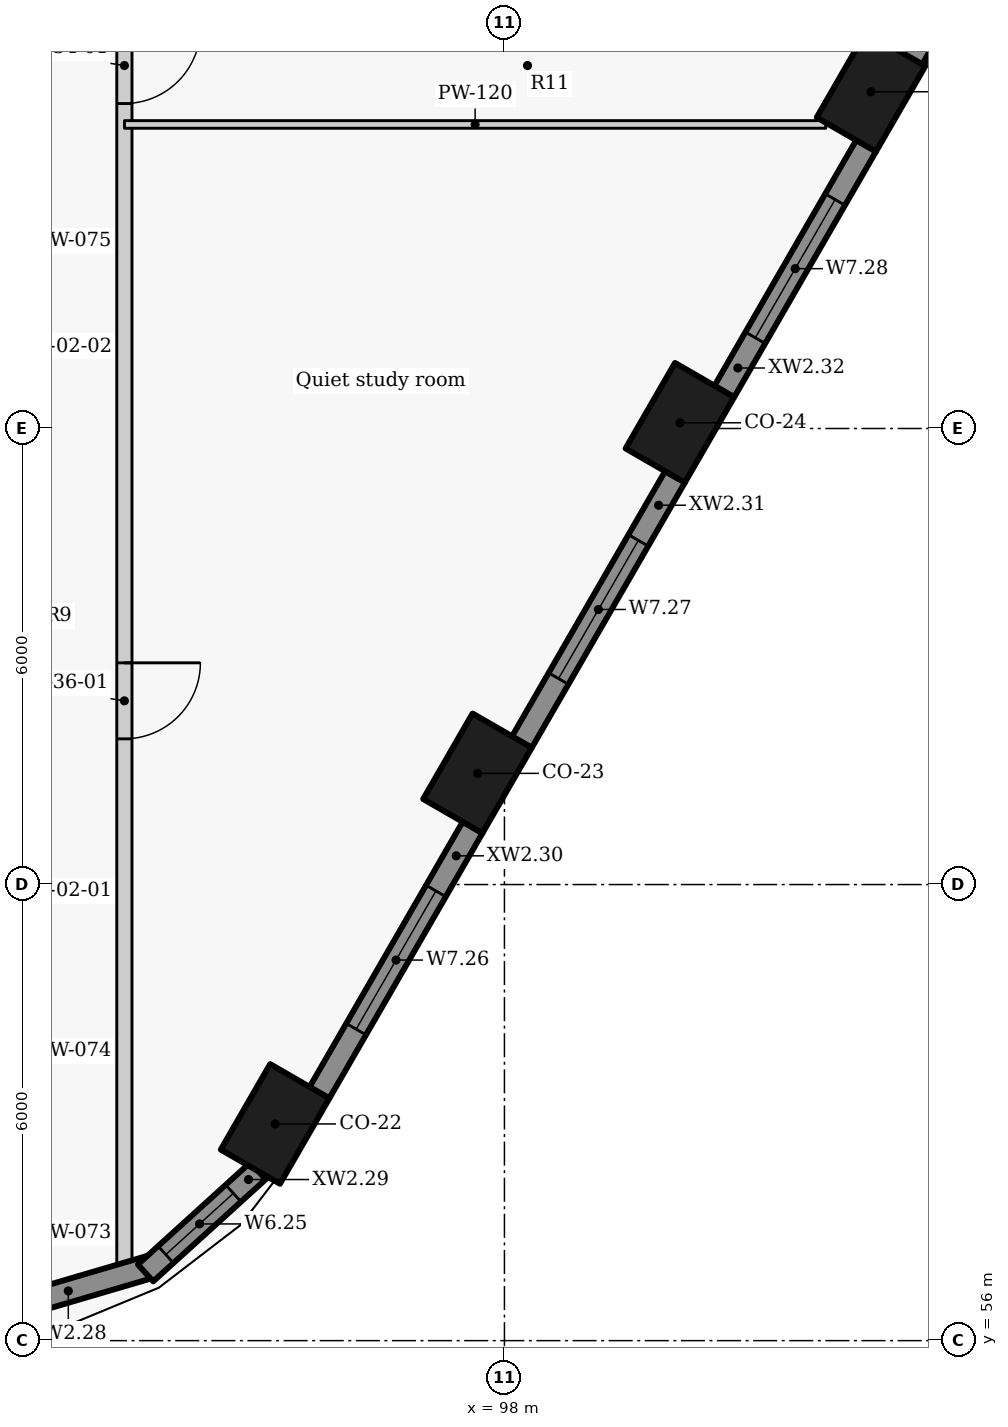
"""IFC4 building model, lengths in metres.
Left out: names, types, materials, properties, quantities, classifications, styles, units other than length and angle.
Written with IfcOpenShell. Run it as: python <this file> out.ifc"""

import sys

from ifc_helpers import new_model, si_unit, direction, frame, frame_2d, origin, origin_2d, place, context, subcontext, project, spatial, rectangle, extrude, element, fill, save


model = new_model("IFC4")
c1 = context("Model", 3, precision=1e-05, world=origin(), true_north=direction((0.0, 1.0)))
c2 = subcontext(c1, "Body", "Model", "MODEL_VIEW")
j1 = project(units=[si_unit("LENGTHUNIT", "METRE"), si_unit("PLANEANGLEUNIT", "RADIAN")], contexts=[c1])
p1 = place(None, origin())
s1 = spatial("IfcSite", under=j1, at=p1, CompositionType="ELEMENT")
p2 = place(p1, origin())
s2 = spatial("IfcBuilding", under=s1, at=p2, CompositionType="ELEMENT")
p3 = place(p2, frame((0.0, 0.0, 166.8)))
s3 = spatial("IfcBuildingStorey", under=s2, at=p3, CompositionType="ELEMENT", Elevation=166.8)
for number, where, z_axis, x_axis in (
    (1, (94.982, 58.851, 0.0), (0.0, 0.0, 1.0), (0.5, 0.866, 0.0)),
    (2, (97.646, 63.463, 0.0), (0.0, 0.0, 1.0), (0.5, 0.866, 0.0)),
    (3, (100.308, 68.075, 0.0), (0.0, 0.0, 1.0), (0.5, 0.866, 0.0)),
    (4, (102.823, 72.43, 0.0), (0.0, 0.0, 1.0), (0.5, 0.866, 0.0)),
):
    element("IfcColumn", number, at=place(p3, frame(where, z_axis=z_axis, x_axis=x_axis)), inside=s3, PredefinedType="COLUMN", context=c2, shape_type="SweptSolid", body=[
        extrude(rectangle(XDim=1.3, YDim=0.9, at=origin_2d()), origin(), (0.0, 0.0, 1.0), 3.3),
    ])
p4 = place(p3, frame((91.153, 56.328, 0.0), z_axis=(0.0, 0.0, 1.0), x_axis=(0.959473072336, 0.281800325517, 0.0)))
e5 = element("IfcWall", 5, at=p4, inside=s3, PredefinedType="SOLIDWALL", context=c2, shape_type="SweptSolid", body=[
    extrude(rectangle(XDim=2.312, YDim=0.3, at=frame_2d((1.156, 0.0))), origin(), (0.0, 0.0, 1.0), 2.05),
])
p5 = place(p3, frame((93.278, 56.89, 0.0), z_axis=(0.0, 0.0, 1.0), x_axis=(0.740652597499, 0.671888182526, 0.0)))
e6 = element("IfcWall", 6, at=p5, inside=s3, PredefinedType="SOLIDWALL", context=c2, shape_type="SweptSolid", body=[
    extrude(rectangle(XDim=1.999, YDim=0.3, at=frame_2d((1.0, 0.0))), origin(), (0.0, 0.0, 1.0), 2.05),
])
p6 = place(p5, frame((0.36, 0.0, 0.9)))
e7 = element("IfcOpeningElement", 7, at=p6, cuts=e6, PredefinedType="OPENING", context=c2, shape_type="SweptSolid", body=[
    extrude(rectangle(XDim=1.2, YDim=1.1, at=frame_2d((0.6, 0.55))), frame((0.0, 0.16, 0.0), z_axis=(0.0, -1.0, 0.0), x_axis=(1.0, 0.0, 0.0)), (0.0, 0.0, 1.0), 0.32),
])
p7 = place(p3, frame((95.565, 59.26, 0.0), z_axis=(0.0, 0.0, 1.0), x_axis=(0.500031546601, 0.86600718958, 0.0)))
e8 = element("IfcWall", 8, at=p7, inside=s3, PredefinedType="SOLIDWALL", context=c2, shape_type="SweptSolid", body=[
    extrude(rectangle(XDim=4.034, YDim=0.3, at=frame_2d((2.017, 0.0))), origin(), (0.0, 0.0, 1.0), 2.05),
])
p8 = place(p7, frame((0.967, 0.0, 0.9)))
e9 = element("IfcOpeningElement", 9, at=p8, cuts=e8, PredefinedType="OPENING", context=c2, shape_type="SweptSolid", body=[
    extrude(rectangle(XDim=2.1, YDim=1.1, at=frame_2d((1.05, 0.55))), frame((0.0, 0.16, 0.0), z_axis=(0.0, -1.0, 0.0), x_axis=(1.0, 0.0, 0.0)), (0.0, 0.0, 1.0), 0.32),
])
p9 = place(p3, frame((98.228, 63.872, 0.0), z_axis=(0.0, 0.0, 1.0), x_axis=(0.500031546601, 0.86600718958, 0.0)))
e10 = element("IfcWall", 10, at=p9, inside=s3, PredefinedType="SOLIDWALL", context=c2, shape_type="SweptSolid", body=[
    extrude(rectangle(XDim=4.034, YDim=0.3, at=frame_2d((2.017, 0.0))), origin(), (0.0, 0.0, 1.0), 2.05),
])
p10 = place(p9, frame((0.967, 0.0, 0.9)))
e11 = element("IfcOpeningElement", 11, at=p10, cuts=e10, PredefinedType="OPENING", context=c2, shape_type="SweptSolid", body=[
    extrude(rectangle(XDim=2.1, YDim=1.1, at=frame_2d((1.05, 0.55))), frame((0.0, 0.16, 0.0), z_axis=(0.0, -1.0, 0.0), x_axis=(1.0, 0.0, 0.0)), (0.0, 0.0, 1.0), 0.32),
])
p11 = place(p3, frame((100.891, 68.485, 0.0), z_axis=(0.0, 0.0, 1.0), x_axis=(0.499933594891, 0.866063739398, 0.0)))
e12 = element("IfcWall", 12, at=p11, inside=s3, PredefinedType="SOLIDWALL", context=c2, shape_type="SweptSolid", body=[
    extrude(rectangle(XDim=3.737, YDim=0.3, at=frame_2d((1.868, 0.0))), origin(), (0.0, 0.0, 1.0), 2.05),
])
p12 = place(p11, frame((0.818, 0.0, 0.9)))
e13 = element("IfcOpeningElement", 13, at=p12, cuts=e12, PredefinedType="OPENING", context=c2, shape_type="SweptSolid", body=[
    extrude(rectangle(XDim=2.1, YDim=1.1, at=frame_2d((1.05, 0.55))), frame((0.0, 0.16, 0.0), z_axis=(0.0, -1.0, 0.0), x_axis=(1.0, 0.0, 0.0)), (0.0, 0.0, 1.0), 0.32),
])
p13 = place(p3, frame((103.366, 72.863, 0.0), z_axis=(0.0, 0.0, 1.0), x_axis=(0.492498306264, 0.87031340236, 0.0)))
e14 = element("IfcWall", 14, at=p13, inside=s3, PredefinedType="SOLIDWALL", context=c2, shape_type="SweptSolid", body=[
    extrude(rectangle(XDim=5.727, YDim=0.3, at=frame_2d((2.863, 0.0))), origin(), (0.0, 0.0, 1.0), 2.05),
])
p14 = place(p13, frame((1.093, 0.0, 0.9)))
e15 = element("IfcOpeningElement", 15, at=p14, cuts=e14, PredefinedType="OPENING", context=c2, shape_type="SweptSolid", body=[
    extrude(rectangle(XDim=1.5, YDim=1.1, at=frame_2d((0.75, 0.55))), frame((0.0, 0.16, 0.0), z_axis=(0.0, -1.0, 0.0), x_axis=(1.0, 0.0, 0.0)), (0.0, 0.0, 1.0), 0.32),
])
p15 = place(p13, frame((3.334, 0.0, 0.9)))
e16 = element("IfcOpeningElement", 16, at=p15, cuts=e14, PredefinedType="OPENING", context=c2, shape_type="SweptSolid", body=[
    extrude(rectangle(XDim=1.5, YDim=1.1, at=frame_2d((0.75, 0.55))), frame((0.0, 0.16, 0.0), z_axis=(0.0, -1.0, 0.0), x_axis=(1.0, 0.0, 0.0)), (0.0, 0.0, 1.0), 0.32),
])
p16 = place(p3, frame((93.0, 102.498, 0.0), z_axis=(0.0, 0.0, 1.0), x_axis=(0.0, -1.0, 0.0)))
e17 = element("IfcWall", 17, at=p16, inside=s3, PredefinedType="PARTITIONING", context=c2, shape_type="SweptSolid", body=[
    extrude(rectangle(XDim=45.665, YDim=0.2, at=frame_2d((22.833, 0.0))), origin(), (0.0, 0.0, 1.0), 2.03),
])
p17 = place(p16, frame((37.581, 0.0, 0.0)))
e18 = element("IfcOpeningElement", 18, at=p17, cuts=e17, PredefinedType="OPENING", context=c2, shape_type="SweptSolid", body=[
    extrude(rectangle(XDim=1.0, YDim=2.01, at=frame_2d((0.5, 1.005))), frame((0.0, 0.11, 0.0), z_axis=(0.0, -1.0, 0.0), x_axis=(1.0, 0.0, 0.0)), (0.0, 0.0, 1.0), 0.22),
])
p18 = place(p16, frame((29.223, 0.0, 0.0)))
e19 = element("IfcOpeningElement", 19, at=p18, cuts=e17, PredefinedType="OPENING", context=c2, shape_type="SweptSolid", body=[
    extrude(rectangle(XDim=1.0, YDim=2.01, at=frame_2d((0.5, 1.005))), frame((0.0, 0.11, 0.0), z_axis=(0.0, -1.0, 0.0), x_axis=(1.0, 0.0, 0.0)), (0.0, 0.0, 1.0), 0.22),
])
p19 = place(p16, frame((19.223, 0.0, 0.0)))
e20 = element("IfcOpeningElement", 20, at=p19, cuts=e17, PredefinedType="OPENING", context=c2, shape_type="SweptSolid", body=[
    extrude(rectangle(XDim=1.0, YDim=2.01, at=frame_2d((0.5, 1.005))), frame((0.0, 0.11, 0.0), z_axis=(0.0, -1.0, 0.0), x_axis=(1.0, 0.0, 0.0)), (0.0, 0.0, 1.0), 0.22),
])
p20 = place(p3, frame((93.001, 72.0, 0.0), z_axis=(0.0, 0.0, 1.0), x_axis=(1.0, 0.0, 0.0)))
e21 = element("IfcWall", 21, at=p20, inside=s3, PredefinedType="PARTITIONING", context=c2, shape_type="SweptSolid", body=[
    extrude(rectangle(XDim=9.227, YDim=0.1, at=frame_2d((4.614, 0.0))), origin(), (0.0, 0.0, 1.0), 2.95),
])
p21 = place(p6, origin())
e22 = element("IfcWindow", 22, at=p21, inside=s3, PartitioningType="SINGLE_PANEL", PredefinedType="WINDOW", context=c2, shape_type="SweptSolid", body=[
    extrude(rectangle(XDim=1.2, YDim=1.1, at=frame_2d((0.6, 0.55))), frame((0.0, 0.03, 0.0), z_axis=(0.0, -1.0, 0.0), x_axis=(1.0, 0.0, 0.0)), (0.0, 0.0, 1.0), 0.06),
])
fill(e7, e22)
p22 = place(p8, origin())
e23 = element("IfcWindow", 23, at=p22, inside=s3, PartitioningType="SINGLE_PANEL", PredefinedType="WINDOW", context=c2, shape_type="SweptSolid", body=[
    extrude(rectangle(XDim=2.1, YDim=1.1, at=frame_2d((1.05, 0.55))), frame((0.0, 0.03, 0.0), z_axis=(0.0, -1.0, 0.0), x_axis=(1.0, 0.0, 0.0)), (0.0, 0.0, 1.0), 0.06),
])
fill(e9, e23)
p23 = place(p10, origin())
e24 = element("IfcWindow", 24, at=p23, inside=s3, PartitioningType="SINGLE_PANEL", PredefinedType="WINDOW", context=c2, shape_type="SweptSolid", body=[
    extrude(rectangle(XDim=2.1, YDim=1.1, at=frame_2d((1.05, 0.55))), frame((0.0, 0.03, 0.0), z_axis=(0.0, -1.0, 0.0), x_axis=(1.0, 0.0, 0.0)), (0.0, 0.0, 1.0), 0.06),
])
fill(e11, e24)
p24 = place(p12, origin())
e25 = element("IfcWindow", 25, at=p24, inside=s3, PartitioningType="SINGLE_PANEL", PredefinedType="WINDOW", context=c2, shape_type="SweptSolid", body=[
    extrude(rectangle(XDim=2.1, YDim=1.1, at=frame_2d((1.05, 0.55))), frame((0.0, 0.03, 0.0), z_axis=(0.0, -1.0, 0.0), x_axis=(1.0, 0.0, 0.0)), (0.0, 0.0, 1.0), 0.06),
])
fill(e13, e25)
p25 = place(p17, origin())
e26 = element("IfcDoor", 26, at=p25, inside=s3, OperationType="SINGLE_SWING_LEFT", PredefinedType="DOOR", context=c2, shape_type="SweptSolid", body=[
    extrude(rectangle(XDim=1.0, YDim=2.01, at=frame_2d((0.5, 1.005))), frame((0.0, 0.025, 0.0), z_axis=(0.0, -1.0, 0.0), x_axis=(1.0, 0.0, 0.0)), (0.0, 0.0, 1.0), 0.05),
])
fill(e18, e26)
p26 = place(p18, origin())
e27 = element("IfcDoor", 27, at=p26, inside=s3, OperationType="SINGLE_SWING_LEFT", PredefinedType="DOOR", context=c2, shape_type="SweptSolid", body=[
    extrude(rectangle(XDim=1.0, YDim=2.01, at=frame_2d((0.5, 1.005))), frame((0.0, 0.025, 0.0), z_axis=(0.0, -1.0, 0.0), x_axis=(1.0, 0.0, 0.0)), (0.0, 0.0, 1.0), 0.05),
])
fill(e19, e27)
save(model, sys.argv[1])
